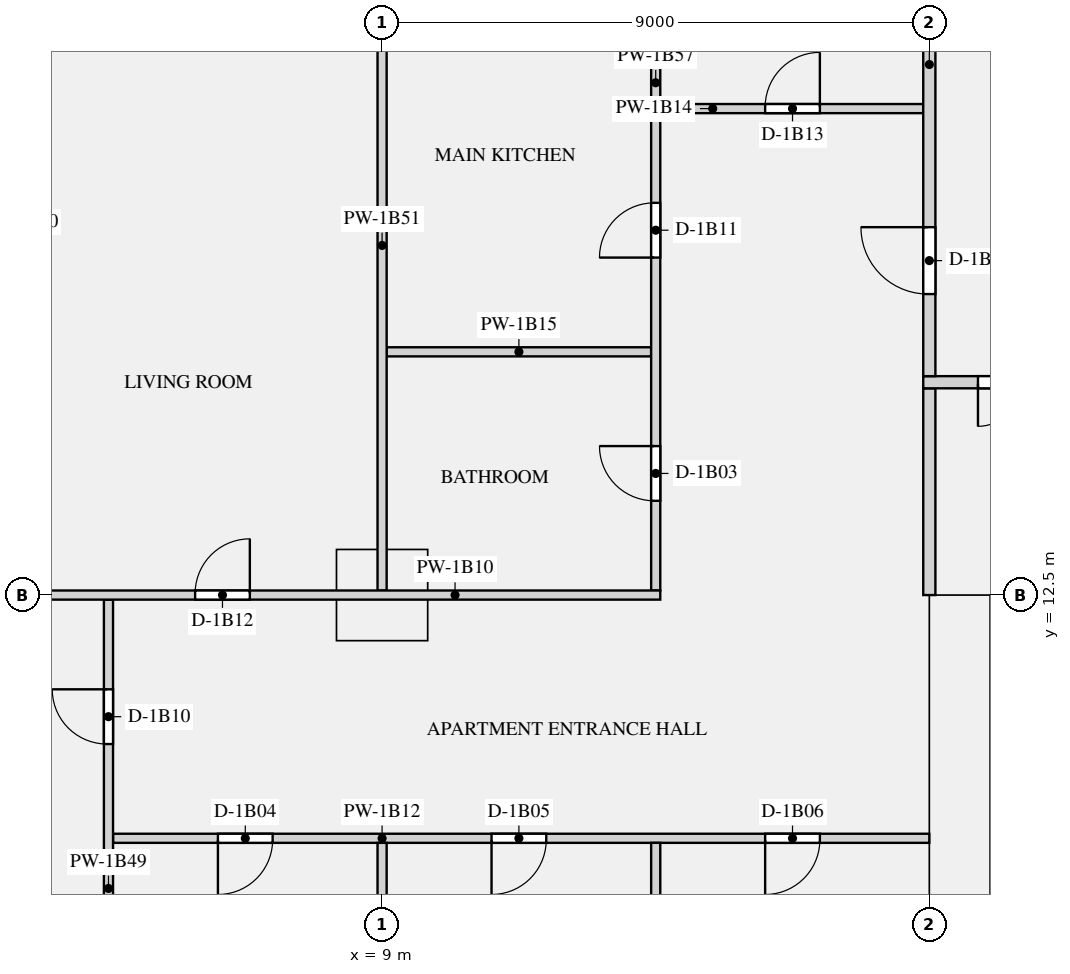
"""IFC4 building model, lengths in metres.
Left out: names, types, materials, properties, quantities, classifications, styles, units other than length and angle.
Written with IfcOpenShell. Run it as: python <this file> out.ifc"""

import sys

from ifc_helpers import new_model, si_unit, direction, frame, frame_2d, origin, origin_2d, place, context, subcontext, project, spatial, rectangle, extrude, element, fill, save


model = new_model("IFC4")
c1 = context("Model", 3, precision=1e-05, world=origin(), true_north=direction((0.0, 1.0)))
c2 = subcontext(c1, "Body", "Model", "MODEL_VIEW")
j1 = project(units=[si_unit("LENGTHUNIT", "METRE"), si_unit("PLANEANGLEUNIT", "RADIAN")], contexts=[c1])
p1 = place(None, origin())
s1 = spatial("IfcSite", under=j1, at=p1, CompositionType="ELEMENT")
p2 = place(p1, origin())
s2 = spatial("IfcBuilding", under=s1, at=p2, CompositionType="ELEMENT")
p3 = place(p2, frame((0.0, 0.0, 28.95)))
s3 = spatial("IfcBuildingStorey", under=s2, at=p3, CompositionType="ELEMENT", Elevation=28.95)
p4 = place(p3, frame((9.0, 12.5, 0.0), z_axis=(0.0, 0.0, 1.0), x_axis=(1.0, 0.0, 0.0)))
e1 = element("IfcColumn", 1, at=p4, inside=s3, PredefinedType="COLUMN", context=c2, shape_type="SweptSolid", body=[
    extrude(rectangle(XDim=1.5, YDim=1.5, at=origin_2d()), origin(), (0.0, 0.0, 1.0), 3.15),
])
p5 = place(p3, frame((18.5, 0.0, 0.0), z_axis=(0.0, 0.0, 1.0), x_axis=(0.0, 1.0, 0.0)))
e2 = element("IfcWall", 2, at=p5, inside=s3, PredefinedType="SHEAR", context=c2, shape_type="SweptSolid", body=[
    extrude(rectangle(XDim=12.5, YDim=1.0, at=frame_2d((6.25, 0.0))), origin(), (0.0, 0.0, 1.0), 3.15),
])
p6 = place(p3, frame((18.0, 12.5, 0.0), z_axis=(0.0, 0.0, 1.0), x_axis=(0.0, 1.0, 0.0)))
e3 = element("IfcWall", 3, at=p6, inside=s3, PredefinedType="PARTITIONING", context=c2, shape_type="SweptSolid", body=[
    extrude(rectangle(XDim=3.4, YDim=0.2, at=frame_2d((1.7, 0.0))), origin(), (0.0, 0.0, 1.0), 2.83),
])
p7 = place(p3, frame((0.8, 12.5, 0.0), z_axis=(0.0, 0.0, 1.0), x_axis=(1.0, 0.0, 0.0)))
e4 = element("IfcWall", 4, at=p7, inside=s3, PredefinedType="PARTITIONING", context=c2, shape_type="SweptSolid", body=[
    extrude(rectangle(XDim=12.775, YDim=0.15, at=frame_2d((6.387, 0.0))), origin(), (0.0, 0.0, 1.0), 2.83),
])
p8 = place(p7, frame((5.125, 0.0, 0.0)))
e5 = element("IfcOpeningElement", 5, at=p8, cuts=e4, PredefinedType="OPENING", context=c2, shape_type="SweptSolid", body=[
    extrude(rectangle(XDim=0.9, YDim=2.1, at=frame_2d((0.45, 1.05))), frame((0.0, 0.085, 0.0), z_axis=(0.0, -1.0, 0.0), x_axis=(1.0, 0.0, 0.0)), (0.0, 0.0, 1.0), 0.17),
])
p9 = place(p3, frame((4.575, 8.5, 0.0), z_axis=(0.0, 0.0, 1.0), x_axis=(1.0, 0.0, 0.0)))
e6 = element("IfcWall", 6, at=p9, inside=s3, PredefinedType="PARTITIONING", context=c2, shape_type="SweptSolid", body=[
    extrude(rectangle(XDim=13.425, YDim=0.15, at=frame_2d((6.712, 0.0))), origin(), (0.0, 0.0, 1.0), 2.83),
])
p10 = place(p9, frame((1.725, 0.0, 0.0)))
e7 = element("IfcOpeningElement", 7, at=p10, cuts=e6, PredefinedType="OPENING", context=c2, shape_type="SweptSolid", body=[
    extrude(rectangle(XDim=0.9, YDim=2.1, at=frame_2d((0.45, 1.05))), frame((0.0, 0.085, 0.0), z_axis=(0.0, -1.0, 0.0), x_axis=(1.0, 0.0, 0.0)), (0.0, 0.0, 1.0), 0.17),
])
p11 = place(p9, frame((6.225, 0.0, 0.0)))
e8 = element("IfcOpeningElement", 8, at=p11, cuts=e6, PredefinedType="OPENING", context=c2, shape_type="SweptSolid", body=[
    extrude(rectangle(XDim=0.9, YDim=2.1, at=frame_2d((0.45, 1.05))), frame((0.0, 0.085, 0.0), z_axis=(0.0, -1.0, 0.0), x_axis=(1.0, 0.0, 0.0)), (0.0, 0.0, 1.0), 0.17),
])
p12 = place(p9, frame((10.725, 0.0, 0.0)))
e9 = element("IfcOpeningElement", 9, at=p12, cuts=e6, PredefinedType="OPENING", context=c2, shape_type="SweptSolid", body=[
    extrude(rectangle(XDim=0.9, YDim=2.1, at=frame_2d((0.45, 1.05))), frame((0.0, 0.085, 0.0), z_axis=(0.0, -1.0, 0.0), x_axis=(1.0, 0.0, 0.0)), (0.0, 0.0, 1.0), 0.17),
])
p13 = place(p3, frame((13.575, 20.5, 0.0), z_axis=(0.0, 0.0, 1.0), x_axis=(1.0, 0.0, 0.0)))
e10 = element("IfcWall", 10, at=p13, inside=s3, PredefinedType="PARTITIONING", context=c2, shape_type="SweptSolid", body=[
    extrude(rectangle(XDim=4.325, YDim=0.15, at=frame_2d((2.163, 0.0))), origin(), (0.0, 0.0, 1.0), 2.83),
])
p14 = place(p13, frame((1.725, 0.0, 0.0)))
e11 = element("IfcOpeningElement", 11, at=p14, cuts=e10, PredefinedType="OPENING", context=c2, shape_type="SweptSolid", body=[
    extrude(rectangle(XDim=0.9, YDim=2.1, at=frame_2d((0.45, 1.05))), frame((0.0, 0.085, 0.0), z_axis=(0.0, -1.0, 0.0), x_axis=(1.0, 0.0, 0.0)), (0.0, 0.0, 1.0), 0.17),
])
p15 = place(p3, frame((9.075, 16.5, 0.0), z_axis=(0.0, 0.0, 1.0), x_axis=(1.0, 0.0, 0.0)))
e12 = element("IfcWall", 12, at=p15, inside=s3, PredefinedType="PARTITIONING", context=c2, shape_type="SweptSolid", body=[
    extrude(rectangle(XDim=4.35, YDim=0.15, at=frame_2d((2.175, 0.0))), origin(), (0.0, 0.0, 1.0), 2.83),
])
p16 = place(p3, frame((17.9, 16.0, 0.0), z_axis=(0.0, 0.0, 1.0), x_axis=(1.0, 0.0, 0.0)))
e13 = element("IfcWall", 13, at=p16, inside=s3, PredefinedType="PARTITIONING", context=c2, shape_type="SweptSolid", body=[
    extrude(rectangle(XDim=36.2, YDim=0.2, at=frame_2d((18.1, 0.0))), origin(), (0.0, 0.0, 1.0), 2.83),
])
p17 = place(p16, frame((0.9, 0.0, 0.0)))
e14 = element("IfcOpeningElement", 14, at=p17, cuts=e13, PredefinedType="OPENING", context=c2, shape_type="SweptSolid", body=[
    extrude(rectangle(XDim=1.4, YDim=2.1, at=frame_2d((0.7, 1.05))), frame((0.0, 0.11, 0.0), z_axis=(0.0, -1.0, 0.0), x_axis=(1.0, 0.0, 0.0)), (0.0, 0.0, 1.0), 0.22),
])
p18 = place(p16, frame((33.9, 0.0, 0.0)))
e15 = element("IfcOpeningElement", 15, at=p18, cuts=e13, PredefinedType="OPENING", context=c2, shape_type="SweptSolid", body=[
    extrude(rectangle(XDim=1.4, YDim=2.1, at=frame_2d((0.7, 1.05))), frame((0.0, 0.11, 0.0), z_axis=(0.0, -1.0, 0.0), x_axis=(1.0, 0.0, 0.0)), (0.0, 0.0, 1.0), 0.22),
])
p19 = place(p3, frame((18.0, 16.1, 0.0), z_axis=(0.0, 0.0, 1.0), x_axis=(0.0, 1.0, 0.0)))
e16 = element("IfcWall", 16, at=p19, inside=s3, PredefinedType="PARTITIONING", context=c2, shape_type="SweptSolid", body=[
    extrude(rectangle(XDim=7.8, YDim=0.2, at=frame_2d((3.9, 0.0))), origin(), (0.0, 0.0, 1.0), 2.83),
])
p20 = place(p19, frame((1.35, 0.0, 0.0)))
e17 = element("IfcOpeningElement", 17, at=p20, cuts=e16, PredefinedType="OPENING", context=c2, shape_type="SweptSolid", body=[
    extrude(rectangle(XDim=1.1, YDim=2.1, at=frame_2d((0.55, 1.05))), frame((0.0, 0.11, 0.0), z_axis=(0.0, -1.0, 0.0), x_axis=(1.0, 0.0, 0.0)), (0.0, 0.0, 1.0), 0.22),
])
p21 = place(p3, frame((4.5, 5.3, 0.0), z_axis=(0.0, 0.0, 1.0), x_axis=(0.0, 1.0, 0.0)))
e18 = element("IfcWall", 18, at=p21, inside=s3, PredefinedType="PARTITIONING", context=c2, shape_type="SweptSolid", body=[
    extrude(rectangle(XDim=7.125, YDim=0.15, at=frame_2d((3.562, 0.0))), origin(), (0.0, 0.0, 1.0), 2.83),
])
p22 = place(p21, frame((4.75, 0.0, 0.0)))
e19 = element("IfcOpeningElement", 19, at=p22, cuts=e18, PredefinedType="OPENING", context=c2, shape_type="SweptSolid", body=[
    extrude(rectangle(XDim=0.9, YDim=2.1, at=frame_2d((0.45, 1.05))), frame((0.0, 0.085, 0.0), z_axis=(0.0, -1.0, 0.0), x_axis=(1.0, 0.0, 0.0)), (0.0, 0.0, 1.0), 0.17),
])
p23 = place(p3, frame((9.0, 0.8, 0.0), z_axis=(0.0, 0.0, 1.0), x_axis=(0.0, 1.0, 0.0)))
e20 = element("IfcWall", 20, at=p23, inside=s3, PredefinedType="PARTITIONING", context=c2, shape_type="SweptSolid", body=[
    extrude(rectangle(XDim=7.625, YDim=0.15, at=frame_2d((3.812, 0.0))), origin(), (0.0, 0.0, 1.0), 2.83),
])
p24 = place(p3, frame((9.0, 12.575, 0.0), z_axis=(0.0, 0.0, 1.0), x_axis=(0.0, 1.0, 0.0)))
e21 = element("IfcWall", 21, at=p24, inside=s3, PredefinedType="PARTITIONING", context=c2, shape_type="SweptSolid", body=[
    extrude(rectangle(XDim=11.35, YDim=0.15, at=frame_2d((5.675, 0.0))), origin(), (0.0, 0.0, 1.0), 2.83),
])
p25 = place(p3, frame((13.5, 0.8, 0.0), z_axis=(0.0, 0.0, 1.0), x_axis=(0.0, 1.0, 0.0)))
e22 = element("IfcWall", 22, at=p25, inside=s3, PredefinedType="PARTITIONING", context=c2, shape_type="SweptSolid", body=[
    extrude(rectangle(XDim=7.625, YDim=0.15, at=frame_2d((3.812, 0.0))), origin(), (0.0, 0.0, 1.0), 2.83),
])
p26 = place(p3, frame((13.5, 12.575, 0.0), z_axis=(0.0, 0.0, 1.0), x_axis=(0.0, 1.0, 0.0)))
e23 = element("IfcWall", 23, at=p26, inside=s3, PredefinedType="PARTITIONING", context=c2, shape_type="SweptSolid", body=[
    extrude(rectangle(XDim=10.325, YDim=0.15, at=frame_2d((5.163, 0.0))), origin(), (0.0, 0.0, 1.0), 2.83),
])
p27 = place(p26, frame((1.475, 0.0, 0.0)))
e24 = element("IfcOpeningElement", 24, at=p27, cuts=e23, PredefinedType="OPENING", context=c2, shape_type="SweptSolid", body=[
    extrude(rectangle(XDim=0.9, YDim=2.1, at=frame_2d((0.45, 1.05))), frame((0.0, 0.085, 0.0), z_axis=(0.0, -1.0, 0.0), x_axis=(1.0, 0.0, 0.0)), (0.0, 0.0, 1.0), 0.17),
])
p28 = place(p26, frame((5.475, 0.0, 0.0)))
e25 = element("IfcOpeningElement", 25, at=p28, cuts=e23, PredefinedType="OPENING", context=c2, shape_type="SweptSolid", body=[
    extrude(rectangle(XDim=0.9, YDim=2.1, at=frame_2d((0.45, 1.05))), frame((0.0, 0.085, 0.0), z_axis=(0.0, -1.0, 0.0), x_axis=(1.0, 0.0, 0.0)), (0.0, 0.0, 1.0), 0.17),
])
p29 = place(p17, frame((1.4, 0.0, 0.0), z_axis=(0.0, 0.0, 1.0), x_axis=(-1.0, 0.0, 0.0)))
e26 = element("IfcDoor", 26, at=p29, inside=s3, OperationType="DOUBLE_DOOR_SINGLE_SWING", PredefinedType="DOOR", context=c2, shape_type="SweptSolid", body=[
    extrude(rectangle(XDim=1.4, YDim=2.1, at=frame_2d((0.7, 1.05))), frame((0.0, 0.025, 0.0), z_axis=(0.0, -1.0, 0.0), x_axis=(1.0, 0.0, 0.0)), (0.0, 0.0, 1.0), 0.05),
])
fill(e14, e26)
p30 = place(p27, origin())
e27 = element("IfcDoor", 27, at=p30, inside=s3, OperationType="SINGLE_SWING_RIGHT", PredefinedType="DOOR", context=c2, shape_type="SweptSolid", body=[
    extrude(rectangle(XDim=0.9, YDim=2.1, at=frame_2d((0.45, 1.05))), frame((0.0, 0.025, 0.0), z_axis=(0.0, -1.0, 0.0), x_axis=(1.0, 0.0, 0.0)), (0.0, 0.0, 1.0), 0.05),
])
fill(e24, e27)
p31 = place(p10, frame((0.9, 0.0, 0.0), z_axis=(0.0, 0.0, 1.0), x_axis=(-1.0, 0.0, 0.0)))
e28 = element("IfcDoor", 28, at=p31, inside=s3, OperationType="SINGLE_SWING_RIGHT", PredefinedType="DOOR", context=c2, shape_type="SweptSolid", body=[
    extrude(rectangle(XDim=0.9, YDim=2.1, at=frame_2d((0.45, 1.05))), frame((0.0, 0.025, 0.0), z_axis=(0.0, -1.0, 0.0), x_axis=(1.0, 0.0, 0.0)), (0.0, 0.0, 1.0), 0.05),
])
fill(e7, e28)
p32 = place(p11, frame((0.9, 0.0, 0.0), z_axis=(0.0, 0.0, 1.0), x_axis=(-1.0, 0.0, 0.0)))
e29 = element("IfcDoor", 29, at=p32, inside=s3, OperationType="SINGLE_SWING_RIGHT", PredefinedType="DOOR", context=c2, shape_type="SweptSolid", body=[
    extrude(rectangle(XDim=0.9, YDim=2.1, at=frame_2d((0.45, 1.05))), frame((0.0, 0.025, 0.0), z_axis=(0.0, -1.0, 0.0), x_axis=(1.0, 0.0, 0.0)), (0.0, 0.0, 1.0), 0.05),
])
fill(e8, e29)
p33 = place(p12, frame((0.9, 0.0, 0.0), z_axis=(0.0, 0.0, 1.0), x_axis=(-1.0, 0.0, 0.0)))
e30 = element("IfcDoor", 30, at=p33, inside=s3, OperationType="SINGLE_SWING_RIGHT", PredefinedType="DOOR", context=c2, shape_type="SweptSolid", body=[
    extrude(rectangle(XDim=0.9, YDim=2.1, at=frame_2d((0.45, 1.05))), frame((0.0, 0.025, 0.0), z_axis=(0.0, -1.0, 0.0), x_axis=(1.0, 0.0, 0.0)), (0.0, 0.0, 1.0), 0.05),
])
fill(e9, e30)
p34 = place(p22, origin())
e31 = element("IfcDoor", 31, at=p34, inside=s3, OperationType="SINGLE_SWING_RIGHT", PredefinedType="DOOR", context=c2, shape_type="SweptSolid", body=[
    extrude(rectangle(XDim=0.9, YDim=2.1, at=frame_2d((0.45, 1.05))), frame((0.0, 0.025, 0.0), z_axis=(0.0, -1.0, 0.0), x_axis=(1.0, 0.0, 0.0)), (0.0, 0.0, 1.0), 0.05),
])
fill(e19, e31)
p35 = place(p28, origin())
e32 = element("IfcDoor", 32, at=p35, inside=s3, OperationType="SINGLE_SWING_LEFT", PredefinedType="DOOR", context=c2, shape_type="SweptSolid", body=[
    extrude(rectangle(XDim=0.9, YDim=2.1, at=frame_2d((0.45, 1.05))), frame((0.0, 0.025, 0.0), z_axis=(0.0, -1.0, 0.0), x_axis=(1.0, 0.0, 0.0)), (0.0, 0.0, 1.0), 0.05),
])
fill(e25, e32)
p36 = place(p8, origin())
e33 = element("IfcDoor", 33, at=p36, inside=s3, OperationType="SINGLE_SWING_RIGHT", PredefinedType="DOOR", context=c2, shape_type="SweptSolid", body=[
    extrude(rectangle(XDim=0.9, YDim=2.1, at=frame_2d((0.45, 1.05))), frame((0.0, 0.025, 0.0), z_axis=(0.0, -1.0, 0.0), x_axis=(1.0, 0.0, 0.0)), (0.0, 0.0, 1.0), 0.05),
])
fill(e5, e33)
p37 = place(p14, origin())
e34 = element("IfcDoor", 34, at=p37, inside=s3, OperationType="SINGLE_SWING_RIGHT", PredefinedType="DOOR", context=c2, shape_type="SweptSolid", body=[
    extrude(rectangle(XDim=0.9, YDim=2.1, at=frame_2d((0.45, 1.05))), frame((0.0, 0.025, 0.0), z_axis=(0.0, -1.0, 0.0), x_axis=(1.0, 0.0, 0.0)), (0.0, 0.0, 1.0), 0.05),
])
fill(e11, e34)
p38 = place(p20, origin())
e35 = element("IfcDoor", 35, at=p38, inside=s3, OperationType="SINGLE_SWING_RIGHT", PredefinedType="DOOR", context=c2, shape_type="SweptSolid", body=[
    extrude(rectangle(XDim=1.1, YDim=2.1, at=frame_2d((0.55, 1.05))), frame((0.0, 0.025, 0.0), z_axis=(0.0, -1.0, 0.0), x_axis=(1.0, 0.0, 0.0)), (0.0, 0.0, 1.0), 0.05),
])
fill(e17, e35)
save(model, sys.argv[1])
